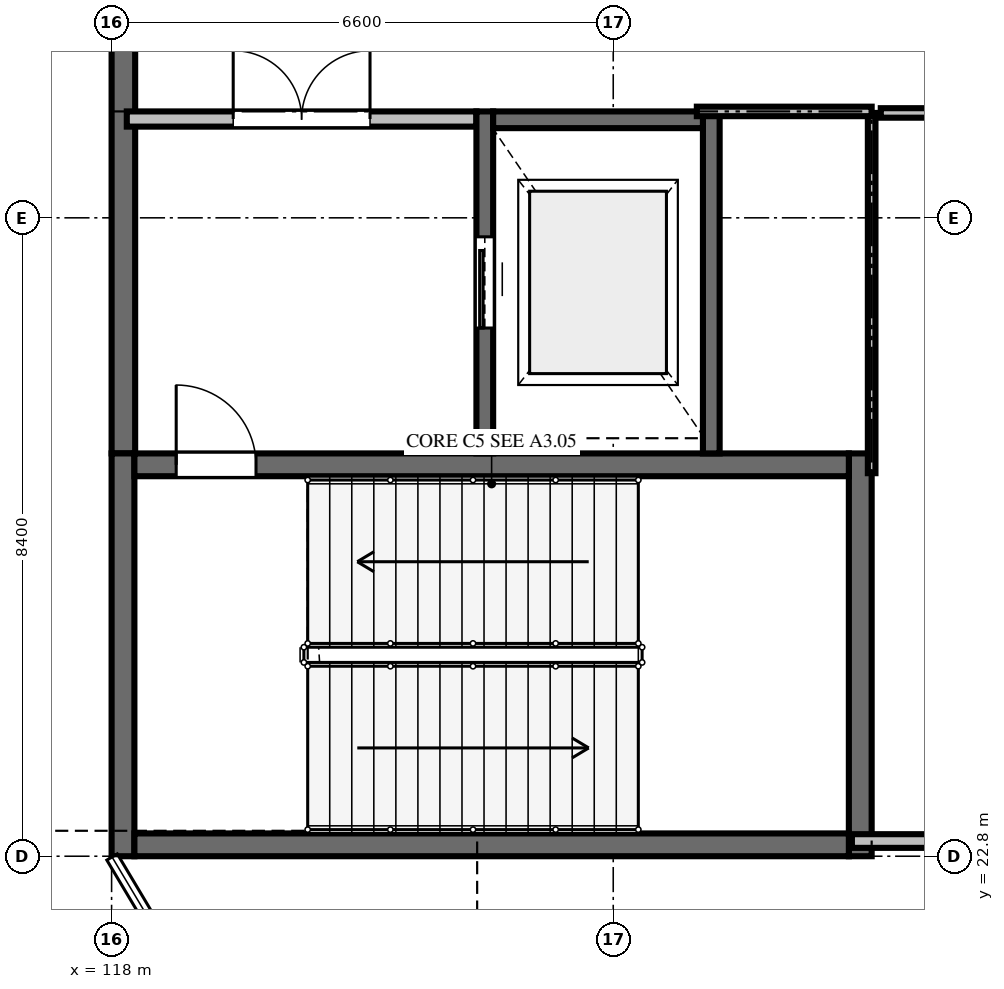
"""IFC4 building model, lengths in metres.
Left out: names, types, materials, properties, quantities, classifications, styles, units other than length and angle.
Written with IfcOpenShell. Run it as: python <this file> out.ifc"""

import sys

from ifc_helpers import new_model, si_unit, direction, frame, frame_2d, origin, place, context, subcontext, project, spatial, rectangle, extrude, element, fill, save


model = new_model("IFC4")
c1 = context("Model", 3, precision=1e-05, world=origin(), true_north=direction((0.0, 1.0)))
c2 = subcontext(c1, "Body", "Model", "MODEL_VIEW")
j1 = project(units=[si_unit("LENGTHUNIT", "METRE"), si_unit("PLANEANGLEUNIT", "RADIAN")], contexts=[c1])
p1 = place(None, origin())
s1 = spatial("IfcSite", under=j1, at=p1, CompositionType="ELEMENT")
p2 = place(p1, origin())
s2 = spatial("IfcBuilding", under=s1, at=p2, CompositionType="ELEMENT")
p3 = place(p2, frame((0.0, 0.0, 16.8)))
s3 = spatial("IfcBuildingStorey", under=s2, at=p3, CompositionType="ELEMENT", Elevation=16.8)
p4 = place(p3, frame((118.155, 28.1, 0.0), z_axis=(0.0, 0.0, 1.0), x_axis=(0.0, 1.0, 0.0)))
e1 = element("IfcWall", 1, at=p4, inside=s3, PredefinedType="SOLIDWALL", context=c2, shape_type="SweptSolid", body=[
    extrude(rectangle(XDim=5.92, YDim=0.31, at=frame_2d((2.96, 0.0))), origin(), (0.0, 0.0, 1.0), 5.1),
])
for number, where, z_axis, x_axis in (
    (2, (118.15, 22.8, 0.0), (0.0, 0.0, 1.0), (0.0, 1.0, 0.0)),
    (3, (127.85, 28.1, 0.0), (0.0, 0.0, 1.0), (0.0, -1.0, 0.0)),
):
    element("IfcWall", number, at=place(p3, frame(where, z_axis=z_axis, x_axis=x_axis)), inside=s3, PredefinedType="SHEAR", context=c2, shape_type="SweptSolid", body=[
        extrude(rectangle(XDim=5.3, YDim=0.3, at=frame_2d((2.65, 0.0))), origin(), (0.0, 0.0, 1.0), 5.15),
    ])
p5 = place(p3, frame((127.7, 22.95, 0.0), z_axis=(0.0, 0.0, 1.0), x_axis=(-1.0, 0.0, 0.0)))
e4 = element("IfcWall", 4, at=p5, inside=s3, PredefinedType="SHEAR", context=c2, shape_type="SweptSolid", body=[
    extrude(rectangle(XDim=9.4, YDim=0.3, at=frame_2d((4.7, 0.0))), origin(), (0.0, 0.0, 1.0), 5.15),
])
p6 = place(p3, frame((118.3, 27.95, 0.0), z_axis=(0.0, 0.0, 1.0), x_axis=(1.0, 0.0, 0.0)))
e5 = element("IfcWall", 5, at=p6, inside=s3, PredefinedType="SHEAR", context=c2, shape_type="SweptSolid", body=[
    extrude(rectangle(XDim=9.4, YDim=0.3, at=frame_2d((4.7, 0.0))), origin(), (0.0, 0.0, 1.0), 5.15),
])
p7 = place(p6, frame((0.55, 0.0, 0.0)))
e6 = element("IfcOpeningElement", 6, at=p7, cuts=e5, PredefinedType="OPENING", context=c2, shape_type="SweptSolid", body=[
    extrude(rectangle(XDim=1.05, YDim=2.2, at=frame_2d((0.525, 1.1))), frame((0.0, 0.16, 0.0), z_axis=(0.0, -1.0, 0.0), x_axis=(1.0, 0.0, 0.0)), (0.0, 0.0, 1.0), 0.32),
])
p8 = place(p3, frame((118.2, 32.5, 0.0), z_axis=(0.0, 0.0, 1.0), x_axis=(1.0, 0.0, 0.0)))
e7 = element("IfcWall", 7, at=p8, inside=s3, PredefinedType="SOLIDWALL", context=c2, shape_type="SweptSolid", body=[
    extrude(rectangle(XDim=4.6, YDim=0.2, at=frame_2d((2.3, 0.0))), origin(), (0.0, 0.0, 1.0), 5.05),
])
p9 = place(p8, frame((1.4, 0.0, 0.0)))
e8 = element("IfcOpeningElement", 8, at=p9, cuts=e7, PredefinedType="OPENING", context=c2, shape_type="SweptSolid", body=[
    extrude(rectangle(XDim=1.8, YDim=2.2, at=frame_2d((0.9, 1.1))), frame((0.0, 0.11, 0.0), z_axis=(0.0, -1.0, 0.0), x_axis=(1.0, 0.0, 0.0)), (0.0, 0.0, 1.0), 0.22),
])
p10 = place(p3, frame((122.91, 28.1, 0.0), z_axis=(0.0, 0.0, 1.0), x_axis=(0.0, 1.0, 0.0)))
e9 = element("IfcWall", 9, at=p10, inside=s3, PredefinedType="SOLIDWALL", context=c2, shape_type="SweptSolid", body=[
    extrude(rectangle(XDim=4.5, YDim=0.22, at=frame_2d((2.25, 0.0))), origin(), (0.0, 0.0, 1.0), 5.15),
])
p11 = place(p10, frame((1.65, 0.0, 0.0)))
e10 = element("IfcOpeningElement", 10, at=p11, cuts=e9, PredefinedType="OPENING", context=c2, shape_type="SweptSolid", body=[
    extrude(rectangle(XDim=1.2, YDim=2.2, at=frame_2d((0.6, 1.1))), frame((0.0, 0.12, 0.0), z_axis=(0.0, -1.0, 0.0), x_axis=(1.0, 0.0, 0.0)), (0.0, 0.0, 1.0), 0.24),
])
p12 = place(p3, frame((125.89, 28.1, 0.0), z_axis=(0.0, 0.0, 1.0), x_axis=(0.0, 1.0, 0.0)))
e11 = element("IfcWall", 11, at=p12, inside=s3, PredefinedType="SOLIDWALL", context=c2, shape_type="SweptSolid", body=[
    extrude(rectangle(XDim=4.5, YDim=0.22, at=frame_2d((2.25, 0.0))), origin(), (0.0, 0.0, 1.0), 5.15),
])
p13 = place(p3, frame((123.02, 32.49, 0.0), z_axis=(0.0, 0.0, 1.0), x_axis=(1.0, 0.0, 0.0)))
e12 = element("IfcWall", 12, at=p13, inside=s3, PredefinedType="SOLIDWALL", context=c2, shape_type="SweptSolid", body=[
    extrude(rectangle(XDim=2.76, YDim=0.22, at=frame_2d((1.38, 0.0))), origin(), (0.0, 0.0, 1.0), 5.15),
])
p14 = place(p3, frame((131.002, 23.0, 0.0), z_axis=(0.0, 0.0, 1.0), x_axis=(-1.0, 0.0, 0.0)))
e13 = element("IfcWall", 13, at=p14, inside=s3, PredefinedType="PARTITIONING", context=c2, shape_type="SweptSolid", body=[
    extrude(rectangle(XDim=3.262, YDim=0.18, at=frame_2d((1.631, 0.0))), origin(), (0.0, 0.0, 1.0), 5.03),
])
p15 = place(p3, frame((128.0, 27.84, 0.0), z_axis=(0.0, 0.0, 1.0), x_axis=(0.0, 1.0, 0.0)))
e14 = element("IfcWall", 14, at=p15, inside=s3, PredefinedType="PARTITIONING", context=c2, shape_type="SweptSolid", body=[
    extrude(rectangle(XDim=4.74, YDim=0.1, at=frame_2d((2.37, 0.0))), origin(), (0.0, 0.0, 1.0), 5.03),
])
p16 = place(p3, frame((128.12, 32.58, 0.0), z_axis=(0.0, 0.0, 1.0), x_axis=(1.0, 0.0, 0.0)))
e15 = element("IfcWall", 15, at=p16, inside=s3, PredefinedType="PARTITIONING", context=c2, shape_type="SweptSolid", body=[
    extrude(rectangle(XDim=6.66, YDim=0.125, at=frame_2d((3.33, 0.0))), origin(), (0.0, 0.0, 1.0), 4.428),
])
p17 = place(p3, frame((128.0, 32.6, 0.0), z_axis=(0.0, 0.0, 1.0), x_axis=(-1.0, 0.0, 0.0)))
e16 = element("IfcWall", 16, at=p17, inside=s3, PredefinedType="PARTITIONING", context=c2, shape_type="SweptSolid", body=[
    extrude(rectangle(XDim=2.3, YDim=0.125, at=frame_2d((1.15, 0.0))), origin(), (0.0, 0.0, 1.0), 5.03),
])
p18 = place(p7, origin())
e17 = element("IfcDoor", 17, at=p18, inside=s3, OperationType="SINGLE_SWING_LEFT", PredefinedType="DOOR", context=c2, shape_type="SweptSolid", body=[
    extrude(rectangle(XDim=1.05, YDim=2.2, at=frame_2d((0.525, 1.1))), frame((0.0, 0.025, 0.0), z_axis=(0.0, -1.0, 0.0), x_axis=(1.0, 0.0, 0.0)), (0.0, 0.0, 1.0), 0.05),
])
fill(e6, e17)
p19 = place(p9, origin())
e18 = element("IfcDoor", 18, at=p19, inside=s3, OperationType="DOUBLE_DOOR_SINGLE_SWING", PredefinedType="DOOR", context=c2, shape_type="SweptSolid", body=[
    extrude(rectangle(XDim=1.8, YDim=2.2, at=frame_2d((0.9, 1.1))), frame((0.0, 0.025, 0.0), z_axis=(0.0, -1.0, 0.0), x_axis=(1.0, 0.0, 0.0)), (0.0, 0.0, 1.0), 0.05),
])
fill(e8, e18)
p20 = place(p11, origin())
e19 = element("IfcDoor", 19, at=p20, inside=s3, OperationType="SLIDING_TO_LEFT", PredefinedType="DOOR", context=c2, shape_type="SweptSolid", body=[
    extrude(rectangle(XDim=1.2, YDim=2.2, at=frame_2d((0.6, 1.1))), frame((0.0, 0.025, 0.0), z_axis=(0.0, -1.0, 0.0), x_axis=(1.0, 0.0, 0.0)), (0.0, 0.0, 1.0), 0.05),
])
fill(e10, e19)
save(model, sys.argv[1])
